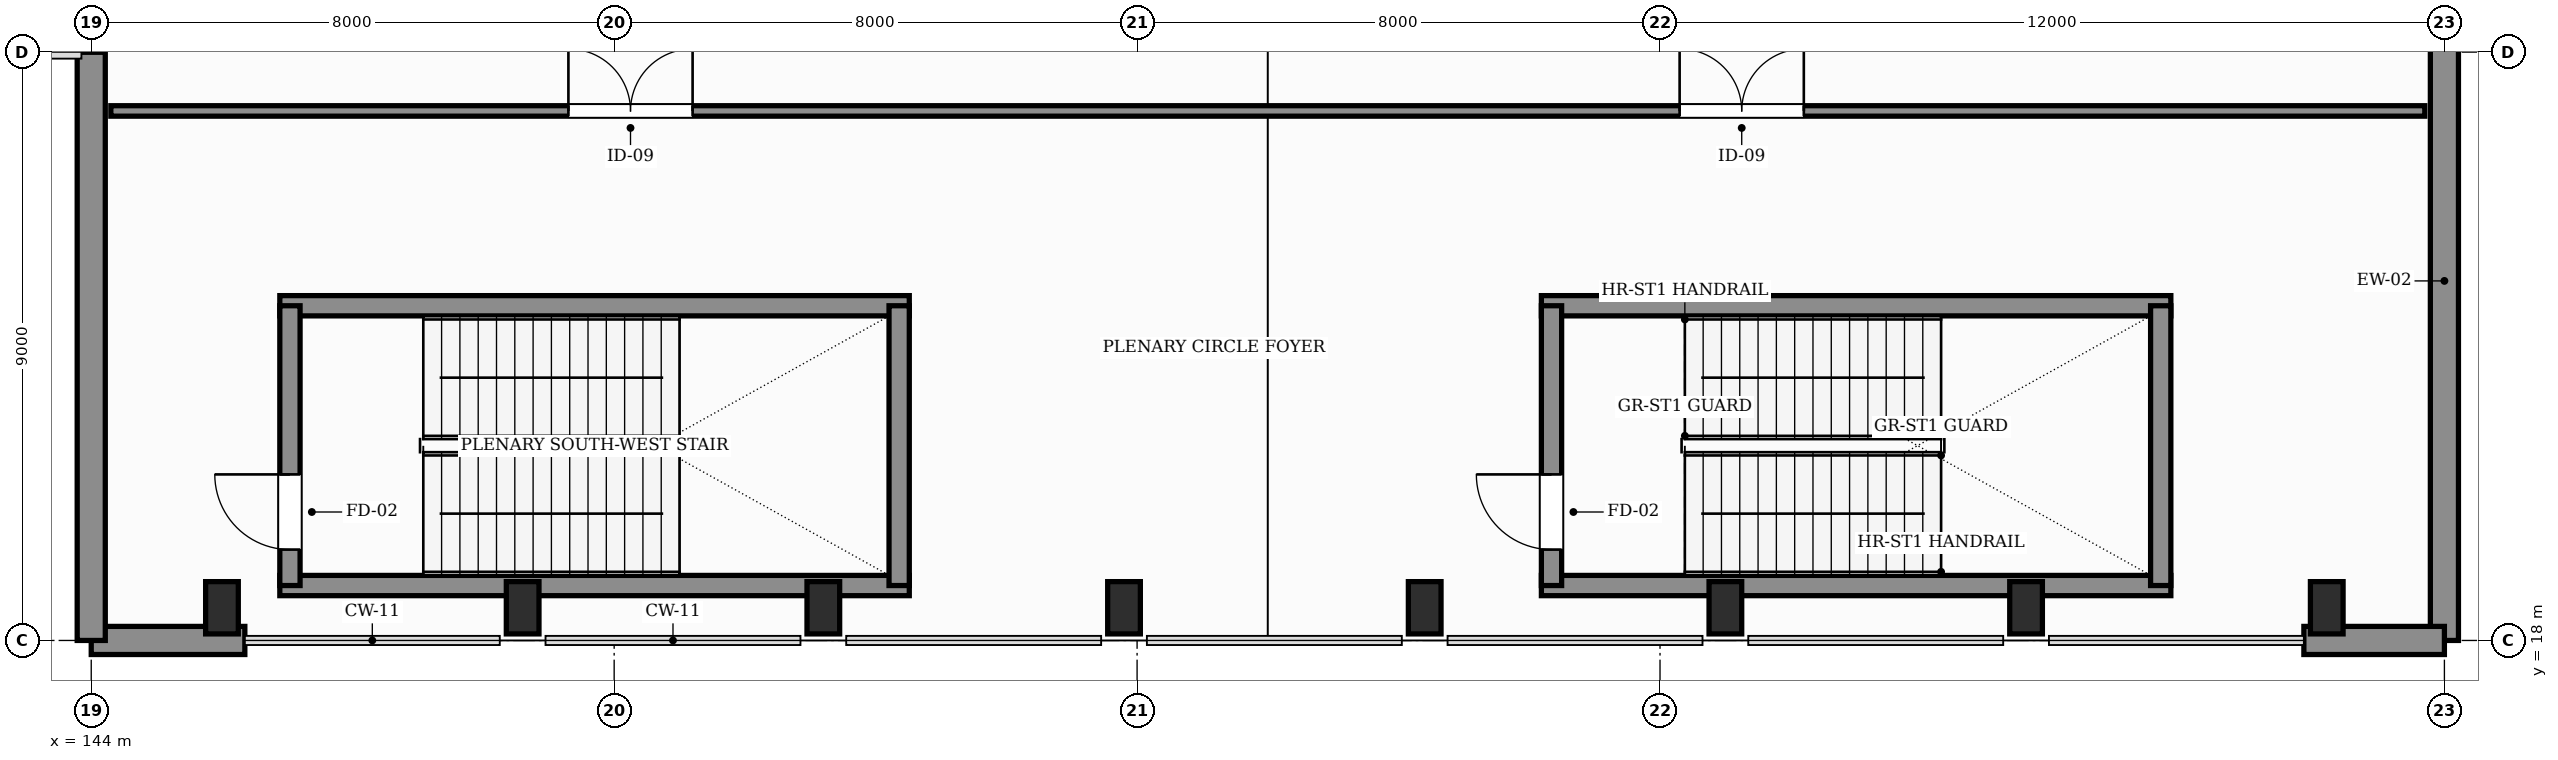
"""IFC4 building model, lengths in metres.
Left out: names, types, materials, properties, quantities, classifications, styles, units other than length and angle.
Written with IfcOpenShell. Run it as: python <this file> out.ifc"""

import sys

from ifc_helpers import new_model, si_unit, direction, frame, frame_2d, origin, origin_2d, place, context, subcontext, project, spatial, rectangle, extrude, element, fill, save


model = new_model("IFC4")
c1 = context("Model", 3, precision=1e-05, world=origin(), true_north=direction((0.0, 1.0)))
c2 = subcontext(c1, "Body", "Model", "MODEL_VIEW")
j1 = project(units=[si_unit("LENGTHUNIT", "METRE"), si_unit("PLANEANGLEUNIT", "RADIAN")], contexts=[c1])
p1 = place(None, origin())
s1 = spatial("IfcSite", under=j1, at=p1, CompositionType="ELEMENT")
p2 = place(p1, origin())
s2 = spatial("IfcBuilding", under=s1, at=p2, CompositionType="ELEMENT")
p3 = place(p2, frame((0.0, 0.0, 6.0)))
s3 = spatial("IfcBuildingStorey", under=s2, at=p3, CompositionType="ELEMENT", Elevation=6.0)
for number, where, z_axis, x_axis in (
    (1, (146.0, 18.5, 0.0), (0.0, 0.0, 1.0), (1.0, 0.0, 0.0)),
    (2, (150.6, 18.5, 0.0), (0.0, 0.0, 1.0), (1.0, 0.0, 0.0)),
    (3, (155.2, 18.5, 0.0), (0.0, 0.0, 1.0), (1.0, 0.0, 0.0)),
    (4, (159.8, 18.5, 0.0), (0.0, 0.0, 1.0), (1.0, 0.0, 0.0)),
    (5, (164.4, 18.5, 0.0), (0.0, 0.0, 1.0), (1.0, 0.0, 0.0)),
    (6, (169.0, 18.5, 0.0), (0.0, 0.0, 1.0), (1.0, 0.0, 0.0)),
    (7, (173.6, 18.5, 0.0), (0.0, 0.0, 1.0), (1.0, 0.0, 0.0)),
    (8, (178.2, 18.5, 0.0), (0.0, 0.0, 1.0), (1.0, 0.0, 0.0)),
):
    element("IfcColumn", number, at=place(p3, frame(where, z_axis=z_axis, x_axis=x_axis)), inside=s3, PredefinedType="PILASTER", context=c2, shape_type="SweptSolid", body=[
        extrude(rectangle(XDim=0.5, YDim=0.8, at=origin_2d()), origin(), (0.0, 0.0, 1.0), 5.4),
    ])
p4 = place(p3, frame((180.0, 18.0, 0.0), z_axis=(0.0, 0.0, 1.0), x_axis=(0.0, 1.0, 0.0)))
e9 = element("IfcWall", 9, at=p4, inside=s3, PredefinedType="SOLIDWALL", context=c2, shape_type="SweptSolid", body=[
    extrude(rectangle(XDim=11.0, YDim=0.43, at=frame_2d((5.5, 0.0))), origin(), (0.0, 0.0, 1.0), 5.4),
])
p5 = place(p3, frame((144.0, 18.0, 0.0), z_axis=(0.0, 0.0, 1.0), x_axis=(1.0, 0.0, 0.0)))
e10 = element("IfcWall", 10, at=p5, inside=s3, PredefinedType="SOLIDWALL", context=c2, shape_type="SweptSolid", body=[
    extrude(rectangle(XDim=2.35, YDim=0.43, at=frame_2d((1.175, 0.0))), origin(), (0.0, 0.0, 1.0), 5.4),
])
p6 = place(p3, frame((177.85, 18.0, 0.0), z_axis=(0.0, 0.0, 1.0), x_axis=(1.0, 0.0, 0.0)))
e11 = element("IfcWall", 11, at=p6, inside=s3, PredefinedType="SOLIDWALL", context=c2, shape_type="SweptSolid", body=[
    extrude(rectangle(XDim=2.15, YDim=0.43, at=frame_2d((1.075, 0.0))), origin(), (0.0, 0.0, 1.0), 5.4),
])
p7 = place(p3, frame((144.0, 18.0, 0.0), z_axis=(0.0, 0.0, 1.0), x_axis=(0.0, 1.0, 0.0)))
e12 = element("IfcWall", 12, at=p7, inside=s3, PredefinedType="SOLIDWALL", context=c2, shape_type="SweptSolid", body=[
    extrude(rectangle(XDim=9.0, YDim=0.43, at=frame_2d((4.5, 0.0))), origin(), (0.0, 0.0, 1.0), 5.4),
])
for number, where, z_axis, x_axis in (
    (13, (166.185, 18.84, 0.0), (0.0, 0.0, 1.0), (1.0, 0.0, 0.0)),
    (14, (166.185, 23.12, 0.0), (0.0, 0.0, 1.0), (1.0, 0.0, 0.0)),
):
    element("IfcWall", number, at=place(p3, frame(where, z_axis=z_axis, x_axis=x_axis)), inside=s3, PredefinedType="SHEAR", context=c2, shape_type="SweptSolid", body=[
        extrude(rectangle(XDim=9.63, YDim=0.31, at=frame_2d((4.815, 0.0))), origin(), (0.0, 0.0, 1.0), 5.4),
    ])
p8 = place(p3, frame((166.34, 18.84, 0.0), z_axis=(0.0, 0.0, 1.0), x_axis=(0.0, 1.0, 0.0)))
e15 = element("IfcWall", 15, at=p8, inside=s3, PredefinedType="SHEAR", context=c2, shape_type="SweptSolid", body=[
    extrude(rectangle(XDim=4.28, YDim=0.31, at=frame_2d((2.14, 0.0))), origin(), (0.0, 0.0, 1.0), 5.4),
])
p9 = place(p8, frame((0.55, 0.0, 0.0)))
e16 = element("IfcOpeningElement", 16, at=p9, cuts=e15, PredefinedType="OPENING", context=c2, shape_type="SweptSolid", body=[
    extrude(rectangle(XDim=1.15, YDim=2.2, at=frame_2d((0.575, 1.1))), frame((0.0, 0.165, 0.0), z_axis=(0.0, -1.0, 0.0), x_axis=(1.0, 0.0, 0.0)), (0.0, 0.0, 1.0), 0.33),
])
p10 = place(p3, frame((175.66, 18.84, 0.0), z_axis=(0.0, 0.0, 1.0), x_axis=(0.0, 1.0, 0.0)))
e17 = element("IfcWall", 17, at=p10, inside=s3, PredefinedType="SHEAR", context=c2, shape_type="SweptSolid", body=[
    extrude(rectangle(XDim=4.28, YDim=0.31, at=frame_2d((2.14, 0.0))), origin(), (0.0, 0.0, 1.0), 5.4),
])
for number, where, z_axis, x_axis in (
    (18, (146.885, 18.84, 0.0), (0.0, 0.0, 1.0), (1.0, 0.0, 0.0)),
    (19, (146.885, 23.12, 0.0), (0.0, 0.0, 1.0), (1.0, 0.0, 0.0)),
):
    element("IfcWall", number, at=place(p3, frame(where, z_axis=z_axis, x_axis=x_axis)), inside=s3, PredefinedType="SHEAR", context=c2, shape_type="SweptSolid", body=[
        extrude(rectangle(XDim=9.63, YDim=0.31, at=frame_2d((4.815, 0.0))), origin(), (0.0, 0.0, 1.0), 5.4),
    ])
p11 = place(p3, frame((147.04, 18.84, 0.0), z_axis=(0.0, 0.0, 1.0), x_axis=(0.0, 1.0, 0.0)))
e20 = element("IfcWall", 20, at=p11, inside=s3, PredefinedType="SHEAR", context=c2, shape_type="SweptSolid", body=[
    extrude(rectangle(XDim=4.28, YDim=0.31, at=frame_2d((2.14, 0.0))), origin(), (0.0, 0.0, 1.0), 5.4),
])
p12 = place(p11, frame((0.55, 0.0, 0.0)))
e21 = element("IfcOpeningElement", 21, at=p12, cuts=e20, PredefinedType="OPENING", context=c2, shape_type="SweptSolid", body=[
    extrude(rectangle(XDim=1.15, YDim=2.2, at=frame_2d((0.575, 1.1))), frame((0.0, 0.165, 0.0), z_axis=(0.0, -1.0, 0.0), x_axis=(1.0, 0.0, 0.0)), (0.0, 0.0, 1.0), 0.33),
])
p13 = place(p3, frame((156.36, 18.84, 0.0), z_axis=(0.0, 0.0, 1.0), x_axis=(0.0, 1.0, 0.0)))
e22 = element("IfcWall", 22, at=p13, inside=s3, PredefinedType="SHEAR", context=c2, shape_type="SweptSolid", body=[
    extrude(rectangle(XDim=4.28, YDim=0.31, at=frame_2d((2.14, 0.0))), origin(), (0.0, 0.0, 1.0), 5.4),
])
p14 = place(p3, frame((144.3, 26.1, 0.0), z_axis=(0.0, 0.0, 1.0), x_axis=(1.0, 0.0, 0.0)))
e23 = element("IfcWall", 23, at=p14, inside=s3, PredefinedType="PARTITIONING", context=c2, shape_type="SweptSolid", body=[
    extrude(rectangle(XDim=35.4, YDim=0.16, at=frame_2d((17.7, 0.0))), origin(), (0.0, 0.0, 1.0), 3.85),
])
p15 = place(p14, frame((7.0, 0.0, 0.0)))
e24 = element("IfcOpeningElement", 24, at=p15, cuts=e23, PredefinedType="OPENING", context=c2, shape_type="SweptSolid", body=[
    extrude(rectangle(XDim=1.9, YDim=2.4, at=frame_2d((0.95, 1.2))), frame((0.0, 0.09, 0.0), z_axis=(0.0, -1.0, 0.0), x_axis=(1.0, 0.0, 0.0)), (0.0, 0.0, 1.0), 0.18),
])
p16 = place(p14, frame((24.0, 0.0, 0.0)))
e25 = element("IfcOpeningElement", 25, at=p16, cuts=e23, PredefinedType="OPENING", context=c2, shape_type="SweptSolid", body=[
    extrude(rectangle(XDim=1.9, YDim=2.4, at=frame_2d((0.95, 1.2))), frame((0.0, 0.09, 0.0), z_axis=(0.0, -1.0, 0.0), x_axis=(1.0, 0.0, 0.0)), (0.0, 0.0, 1.0), 0.18),
])
p17 = place(p9, origin())
e26 = element("IfcDoor", 26, at=p17, inside=s3, OperationType="SINGLE_SWING_RIGHT", PredefinedType="DOOR", context=c2, shape_type="SweptSolid", body=[
    extrude(rectangle(XDim=1.15, YDim=2.2, at=frame_2d((0.575, 1.1))), frame((0.0, 0.025, 0.0), z_axis=(0.0, -1.0, 0.0), x_axis=(1.0, 0.0, 0.0)), (0.0, 0.0, 1.0), 0.05),
])
fill(e16, e26)
p18 = place(p12, origin())
e27 = element("IfcDoor", 27, at=p18, inside=s3, OperationType="SINGLE_SWING_RIGHT", PredefinedType="DOOR", context=c2, shape_type="SweptSolid", body=[
    extrude(rectangle(XDim=1.15, YDim=2.2, at=frame_2d((0.575, 1.1))), frame((0.0, 0.025, 0.0), z_axis=(0.0, -1.0, 0.0), x_axis=(1.0, 0.0, 0.0)), (0.0, 0.0, 1.0), 0.05),
])
fill(e21, e27)
p19 = place(p15, origin())
e28 = element("IfcDoor", 28, at=p19, inside=s3, OperationType="DOUBLE_DOOR_SINGLE_SWING", PredefinedType="DOOR", context=c2, shape_type="SweptSolid", body=[
    extrude(rectangle(XDim=1.9, YDim=2.4, at=frame_2d((0.95, 1.2))), frame((0.0, 0.025, 0.0), z_axis=(0.0, -1.0, 0.0), x_axis=(1.0, 0.0, 0.0)), (0.0, 0.0, 1.0), 0.05),
])
fill(e24, e28)
p20 = place(p16, origin())
e29 = element("IfcDoor", 29, at=p20, inside=s3, OperationType="DOUBLE_DOOR_SINGLE_SWING", PredefinedType="DOOR", context=c2, shape_type="SweptSolid", body=[
    extrude(rectangle(XDim=1.9, YDim=2.4, at=frame_2d((0.95, 1.2))), frame((0.0, 0.025, 0.0), z_axis=(0.0, -1.0, 0.0), x_axis=(1.0, 0.0, 0.0)), (0.0, 0.0, 1.0), 0.05),
])
fill(e25, e29)
save(model, sys.argv[1])
